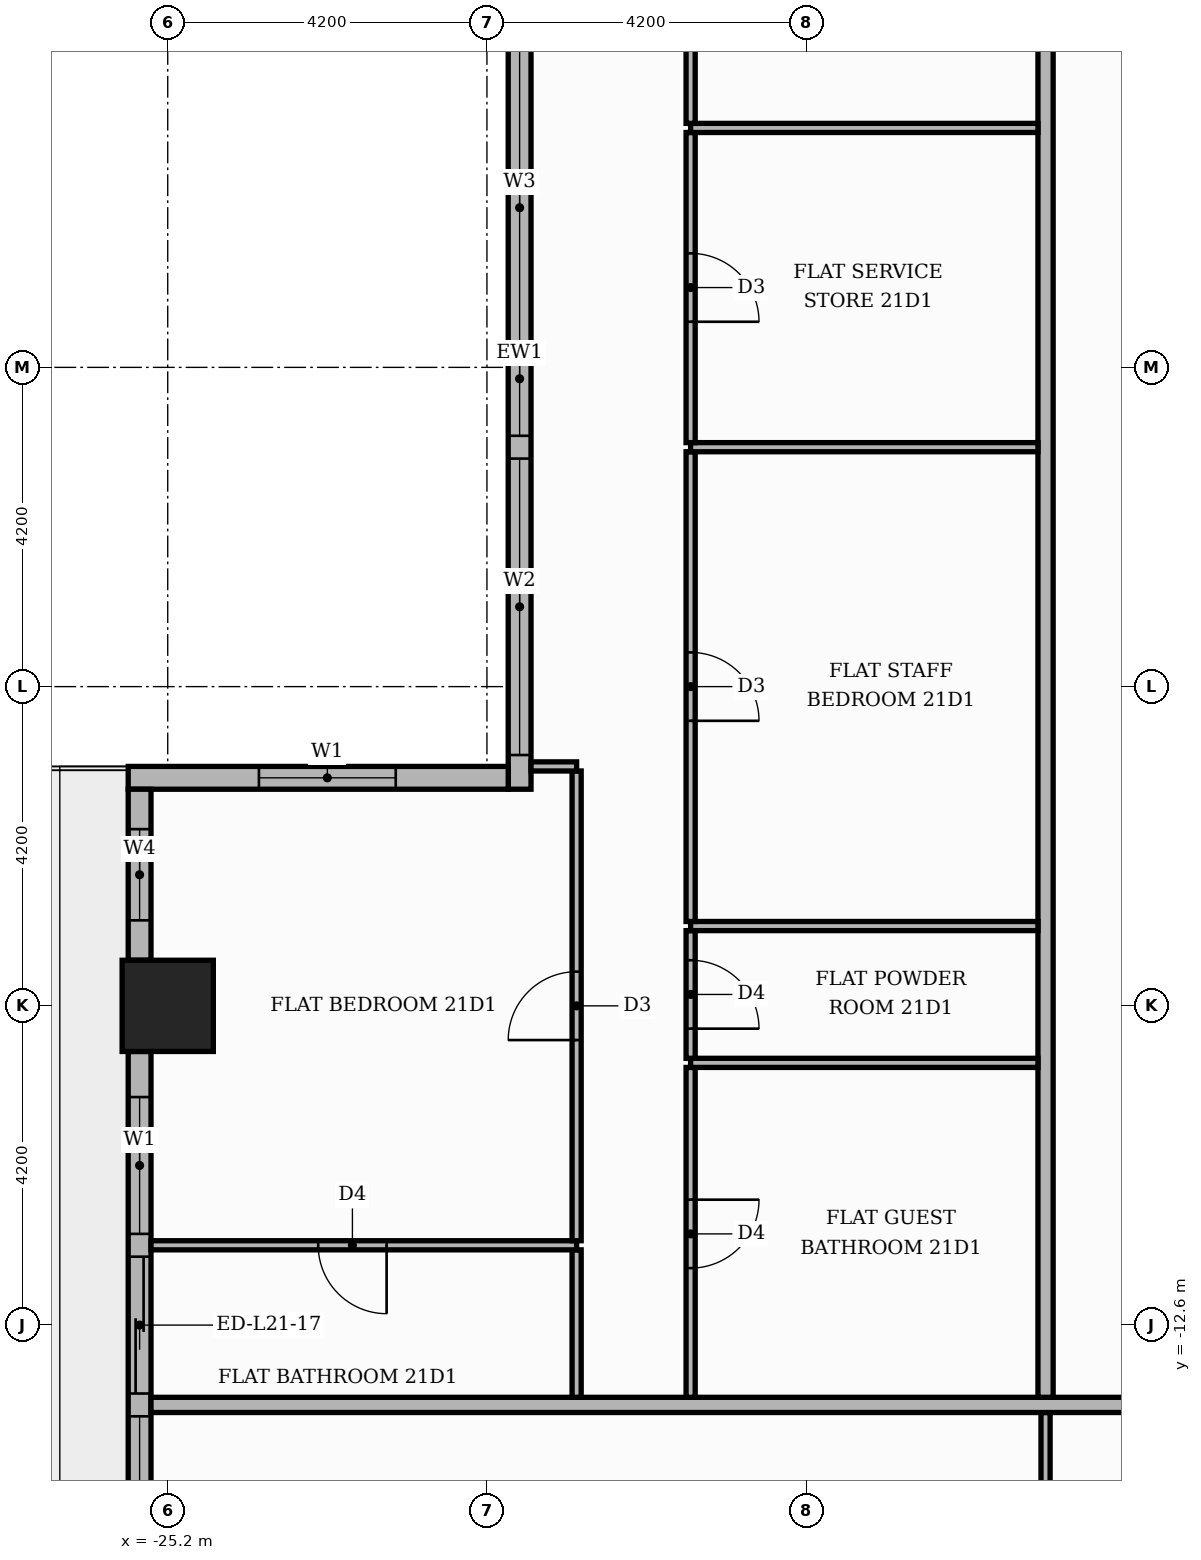
"""IFC4 building model, lengths in metres.
Left out: names, types, materials, properties, quantities, classifications, styles, units other than length and angle.
Written with IfcOpenShell. Run it as: python <this file> out.ifc"""

import sys

from ifc_helpers import new_model, si_unit, direction, frame, frame_2d, origin, origin_2d, place, context, subcontext, project, spatial, rectangle, extrude, element, fill, save


model = new_model("IFC4")
c1 = context("Model", 3, precision=1e-05, world=origin(), true_north=direction((0.0, 1.0)))
c2 = subcontext(c1, "Body", "Model", "MODEL_VIEW")
j1 = project(units=[si_unit("LENGTHUNIT", "METRE"), si_unit("PLANEANGLEUNIT", "RADIAN")], contexts=[c1])
p1 = place(None, origin())
s1 = spatial("IfcSite", under=j1, at=p1, CompositionType="ELEMENT")
p2 = place(p1, origin())
s2 = spatial("IfcBuilding", under=s1, at=p2, CompositionType="ELEMENT")
p3 = place(p2, frame((0.0, 0.0, 90.9)))
s3 = spatial("IfcBuildingStorey", under=s2, at=p3, CompositionType="ELEMENT", Elevation=90.9)
p4 = place(p3, frame((-25.2, -8.4, 0.0), z_axis=(0.0, 0.0, 1.0), x_axis=(1.0, 0.0, 0.0)))
e1 = element("IfcColumn", 1, at=p4, inside=s3, PredefinedType="COLUMN", context=c2, shape_type="SweptSolid", body=[
    extrude(rectangle(XDim=1.2, YDim=1.2, at=origin_2d()), origin(), (0.0, 0.0, 1.0), 3.9),
])
p5 = place(p3, frame((-20.57, 5.25, 0.0), z_axis=(0.0, 0.0, 1.0), x_axis=(0.0, -1.0, 0.0)))
e2 = element("IfcWall", 2, at=p5, inside=s3, PredefinedType="STANDARD", context=c2, shape_type="SweptSolid", body=[
    extrude(rectangle(XDim=10.8, YDim=0.3, at=frame_2d((5.4, 0.0))), origin(), (0.0, 0.0, 1.0), 3.48),
])
p6 = place(p5, frame((0.15, 0.0, 0.9)))
e3 = element("IfcOpeningElement", 3, at=p6, cuts=e2, PredefinedType="OPENING", context=c2, shape_type="SweptSolid", body=[
    extrude(rectangle(XDim=6.0, YDim=2.1, at=frame_2d((3.0, 1.05))), frame((0.0, 0.16, 0.0), z_axis=(0.0, -1.0, 0.0), x_axis=(1.0, 0.0, 0.0)), (0.0, 0.0, 1.0), 0.32),
])
p7 = place(p5, frame((6.45, 0.0, 0.9)))
e4 = element("IfcOpeningElement", 4, at=p7, cuts=e2, PredefinedType="OPENING", context=c2, shape_type="SweptSolid", body=[
    extrude(rectangle(XDim=3.9, YDim=2.1, at=frame_2d((1.95, 1.05))), frame((0.0, 0.16, 0.0), z_axis=(0.0, -1.0, 0.0), x_axis=(1.0, 0.0, 0.0)), (0.0, 0.0, 1.0), 0.32),
])
p8 = place(p3, frame((-20.72, -5.4, 0.0), z_axis=(0.0, 0.0, 1.0), x_axis=(-1.0, 0.0, 0.0)))
e5 = element("IfcWall", 5, at=p8, inside=s3, PredefinedType="STANDARD", context=c2, shape_type="SweptSolid", body=[
    extrude(rectangle(XDim=5.0, YDim=0.3, at=frame_2d((2.5, 0.0))), origin(), (0.0, 0.0, 1.0), 3.48),
])
p9 = place(p8, frame((1.48, 0.0, 0.9)))
e6 = element("IfcOpeningElement", 6, at=p9, cuts=e5, PredefinedType="OPENING", context=c2, shape_type="SweptSolid", body=[
    extrude(rectangle(XDim=1.8, YDim=2.1, at=frame_2d((0.9, 1.05))), frame((0.0, 0.16, 0.0), z_axis=(0.0, -1.0, 0.0), x_axis=(1.0, 0.0, 0.0)), (0.0, 0.0, 1.0), 0.32),
])
p10 = place(p3, frame((-25.57, -5.55, 0.0), z_axis=(0.0, 0.0, 1.0), x_axis=(0.0, -1.0, 0.0)))
e7 = element("IfcWall", 7, at=p10, inside=s3, PredefinedType="STANDARD", context=c2, shape_type="SweptSolid", body=[
    extrude(rectangle(XDim=2.25, YDim=0.3, at=frame_2d((1.125, 0.0))), origin(), (0.0, 0.0, 1.0), 3.48),
])
p11 = place(p10, frame((0.525, 0.0, 0.9)))
e8 = element("IfcOpeningElement", 8, at=p11, cuts=e7, PredefinedType="OPENING", context=c2, shape_type="SweptSolid", body=[
    extrude(rectangle(XDim=1.2, YDim=2.1, at=frame_2d((0.6, 1.05))), frame((0.0, 0.16, 0.0), z_axis=(0.0, -1.0, 0.0), x_axis=(1.0, 0.0, 0.0)), (0.0, 0.0, 1.0), 0.32),
])
p12 = place(p3, frame((-25.57, -9.0, 0.0), z_axis=(0.0, 0.0, 1.0), x_axis=(0.0, -1.0, 0.0)))
e9 = element("IfcWall", 9, at=p12, inside=s3, PredefinedType="STANDARD", context=c2, shape_type="SweptSolid", body=[
    extrude(rectangle(XDim=7.2, YDim=0.3, at=frame_2d((3.6, 0.0))), origin(), (0.0, 0.0, 1.0), 3.48),
])
p13 = place(p12, frame((0.6, 0.0, 0.9)))
e10 = element("IfcOpeningElement", 10, at=p13, cuts=e9, PredefinedType="OPENING", context=c2, shape_type="SweptSolid", body=[
    extrude(rectangle(XDim=1.8, YDim=2.1, at=frame_2d((0.9, 1.05))), frame((0.0, 0.16, 0.0), z_axis=(0.0, -1.0, 0.0), x_axis=(1.0, 0.0, 0.0)), (0.0, 0.0, 1.0), 0.32),
])
p14 = place(p12, frame((2.7, 0.0, 0.0)))
e11 = element("IfcOpeningElement", 11, at=p14, cuts=e9, PredefinedType="OPENING", context=c2, shape_type="SweptSolid", body=[
    extrude(rectangle(XDim=1.8, YDim=2.4, at=frame_2d((0.9, 1.2))), frame((0.0, 0.16, 0.0), z_axis=(0.0, -1.0, 0.0), x_axis=(1.0, 0.0, 0.0)), (0.0, 0.0, 1.0), 0.32),
])
p15 = place(p12, frame((4.8, 0.0, 0.9)))
e12 = element("IfcOpeningElement", 12, at=p15, cuts=e9, PredefinedType="OPENING", context=c2, shape_type="SweptSolid", body=[
    extrude(rectangle(XDim=1.8, YDim=2.1, at=frame_2d((0.9, 1.05))), frame((0.0, 0.16, 0.0), z_axis=(0.0, -1.0, 0.0), x_axis=(1.0, 0.0, 0.0)), (0.0, 0.0, 1.0), 0.32),
])
p16 = place(p3, frame((-13.65, -20.66, 0.0), z_axis=(0.0, 0.0, 1.0), x_axis=(0.0, 1.0, 0.0)))
e13 = element("IfcWall", 13, at=p16, inside=s3, PredefinedType="PARTITIONING", context=c2, shape_type="SweptSolid", body=[
    extrude(rectangle(XDim=6.91, YDim=0.12, at=frame_2d((3.455, 0.0))), origin(), (0.0, 0.0, 1.0), 3.48),
])
p17 = place(p16, frame((3.025, 0.0, 0.0)))
e14 = element("IfcOpeningElement", 14, at=p17, cuts=e13, PredefinedType="OPENING", context=c2, shape_type="SweptSolid", body=[
    extrude(rectangle(XDim=0.9, YDim=2.1, at=frame_2d((0.45, 1.05))), frame((0.0, 0.07, 0.0), z_axis=(0.0, -1.0, 0.0), x_axis=(1.0, 0.0, 0.0)), (0.0, 0.0, 1.0), 0.14),
])
p18 = place(p3, frame((-25.42, -13.65, 0.0), z_axis=(0.0, 0.0, 1.0), x_axis=(1.0, 0.0, 0.0)))
e15 = element("IfcWall", 15, at=p18, inside=s3, PredefinedType="PARTITIONING", context=c2, shape_type="SweptSolid", body=[
    extrude(rectangle(XDim=39.07, YDim=0.2, at=frame_2d((19.535, 0.0))), origin(), (0.0, 0.0, 1.0), 3.48),
])
p19 = place(p18, frame((14.37, 0.0, 0.0)))
e16 = element("IfcOpeningElement", 16, at=p19, cuts=e15, PredefinedType="OPENING", context=c2, shape_type="SweptSolid", body=[
    extrude(rectangle(XDim=1.1, YDim=2.4, at=frame_2d((0.55, 1.2))), frame((0.0, 0.11, 0.0), z_axis=(0.0, -1.0, 0.0), x_axis=(1.0, 0.0, 0.0)), (0.0, 0.0, 1.0), 0.22),
])
p20 = place(p3, frame((-19.82, -13.55, 0.0), z_axis=(0.0, 0.0, 1.0), x_axis=(0.0, 1.0, 0.0)))
e17 = element("IfcWall", 17, at=p20, inside=s3, PredefinedType="PARTITIONING", context=c2, shape_type="SweptSolid", body=[
    extrude(rectangle(XDim=1.94, YDim=0.12, at=frame_2d((0.97, 0.0))), origin(), (0.0, 0.0, 1.0), 3.48),
])
p21 = place(p3, frame((-18.32, -13.55, 0.0), z_axis=(0.0, 0.0, 1.0), x_axis=(0.0, 1.0, 0.0)))
e18 = element("IfcWall", 18, at=p21, inside=s3, PredefinedType="PARTITIONING", context=c2, shape_type="SweptSolid", body=[
    extrude(rectangle(XDim=4.34, YDim=0.12, at=frame_2d((2.17, 0.0))), origin(), (0.0, 0.0, 1.0), 3.48),
])
p22 = place(p21, frame((1.7, 0.0, 0.0)))
e19 = element("IfcOpeningElement", 19, at=p22, cuts=e18, PredefinedType="OPENING", context=c2, shape_type="SweptSolid", body=[
    extrude(rectangle(XDim=0.9, YDim=2.1, at=frame_2d((0.45, 1.05))), frame((0.0, 0.07, 0.0), z_axis=(0.0, -1.0, 0.0), x_axis=(1.0, 0.0, 0.0)), (0.0, 0.0, 1.0), 0.14),
])
p23 = place(p3, frame((-13.65, -13.55, 0.0), z_axis=(0.0, 0.0, 1.0), x_axis=(0.0, 1.0, 0.0)))
e20 = element("IfcWall", 20, at=p23, inside=s3, PredefinedType="PARTITIONING", context=c2, shape_type="SweptSolid", body=[
    extrude(rectangle(XDim=27.1, YDim=0.2, at=frame_2d((13.55, 0.0))), origin(), (0.0, 0.0, 1.0), 3.48),
])
p24 = place(p23, frame((24.55, 0.0, 0.0)))
e21 = element("IfcOpeningElement", 21, at=p24, cuts=e20, PredefinedType="OPENING", context=c2, shape_type="SweptSolid", body=[
    extrude(rectangle(XDim=1.1, YDim=2.4, at=frame_2d((0.55, 1.2))), frame((0.0, 0.11, 0.0), z_axis=(0.0, -1.0, 0.0), x_axis=(1.0, 0.0, 0.0)), (0.0, 0.0, 1.0), 0.22),
])
p25 = place(p3, frame((-25.42, -11.55, 0.0), z_axis=(0.0, 0.0, 1.0), x_axis=(1.0, 0.0, 0.0)))
e22 = element("IfcWall", 22, at=p25, inside=s3, PredefinedType="PARTITIONING", context=c2, shape_type="SweptSolid", body=[
    extrude(rectangle(XDim=5.6, YDim=0.12, at=frame_2d((2.8, 0.0))), origin(), (0.0, 0.0, 1.0), 3.48),
])
p26 = place(p25, frame((2.2, 0.0, 0.0)))
e23 = element("IfcOpeningElement", 23, at=p26, cuts=e22, PredefinedType="OPENING", context=c2, shape_type="SweptSolid", body=[
    extrude(rectangle(XDim=0.9, YDim=2.1, at=frame_2d((0.45, 1.05))), frame((0.0, 0.07, 0.0), z_axis=(0.0, -1.0, 0.0), x_axis=(1.0, 0.0, 0.0)), (0.0, 0.0, 1.0), 0.14),
])
p27 = place(p3, frame((-19.82, -11.49, 0.0), z_axis=(0.0, 0.0, 1.0), x_axis=(0.0, 1.0, 0.0)))
e24 = element("IfcWall", 24, at=p27, inside=s3, PredefinedType="PARTITIONING", context=c2, shape_type="SweptSolid", body=[
    extrude(rectangle(XDim=6.18, YDim=0.12, at=frame_2d((3.09, 0.0))), origin(), (0.0, 0.0, 1.0), 3.48),
])
p28 = place(p27, frame((2.64, 0.0, 0.0)))
e25 = element("IfcOpeningElement", 25, at=p28, cuts=e24, PredefinedType="OPENING", context=c2, shape_type="SweptSolid", body=[
    extrude(rectangle(XDim=0.9, YDim=2.1, at=frame_2d((0.45, 1.05))), frame((0.0, 0.07, 0.0), z_axis=(0.0, -1.0, 0.0), x_axis=(1.0, 0.0, 0.0)), (0.0, 0.0, 1.0), 0.14),
])
p29 = place(p3, frame((-18.32, -9.15, 0.0), z_axis=(0.0, 0.0, 1.0), x_axis=(1.0, 0.0, 0.0)))
e26 = element("IfcWall", 26, at=p29, inside=s3, PredefinedType="PARTITIONING", context=c2, shape_type="SweptSolid", body=[
    extrude(rectangle(XDim=4.57, YDim=0.12, at=frame_2d((2.285, 0.0))), origin(), (0.0, 0.0, 1.0), 3.48),
])
p30 = place(p3, frame((-18.32, -9.09, 0.0), z_axis=(0.0, 0.0, 1.0), x_axis=(0.0, 1.0, 0.0)))
e27 = element("IfcWall", 27, at=p30, inside=s3, PredefinedType="PARTITIONING", context=c2, shape_type="SweptSolid", body=[
    extrude(rectangle(XDim=1.68, YDim=0.12, at=frame_2d((0.84, 0.0))), origin(), (0.0, 0.0, 1.0), 3.48),
])
p31 = place(p30, frame((0.39, 0.0, 0.0)))
e28 = element("IfcOpeningElement", 28, at=p31, cuts=e27, PredefinedType="OPENING", context=c2, shape_type="SweptSolid", body=[
    extrude(rectangle(XDim=0.9, YDim=2.1, at=frame_2d((0.45, 1.05))), frame((0.0, 0.07, 0.0), z_axis=(0.0, -1.0, 0.0), x_axis=(1.0, 0.0, 0.0)), (0.0, 0.0, 1.0), 0.14),
])
p32 = place(p3, frame((-18.32, -7.35, 0.0), z_axis=(0.0, 0.0, 1.0), x_axis=(1.0, 0.0, 0.0)))
e29 = element("IfcWall", 29, at=p32, inside=s3, PredefinedType="PARTITIONING", context=c2, shape_type="SweptSolid", body=[
    extrude(rectangle(XDim=4.57, YDim=0.12, at=frame_2d((2.285, 0.0))), origin(), (0.0, 0.0, 1.0), 3.48),
])
p33 = place(p3, frame((-18.32, -7.29, 0.0), z_axis=(0.0, 0.0, 1.0), x_axis=(0.0, 1.0, 0.0)))
e30 = element("IfcWall", 30, at=p33, inside=s3, PredefinedType="PARTITIONING", context=c2, shape_type="SweptSolid", body=[
    extrude(rectangle(XDim=6.18, YDim=0.12, at=frame_2d((3.09, 0.0))), origin(), (0.0, 0.0, 1.0), 3.48),
])
p34 = place(p33, frame((2.64, 0.0, 0.0)))
e31 = element("IfcOpeningElement", 31, at=p34, cuts=e30, PredefinedType="OPENING", context=c2, shape_type="SweptSolid", body=[
    extrude(rectangle(XDim=0.9, YDim=2.1, at=frame_2d((0.45, 1.05))), frame((0.0, 0.07, 0.0), z_axis=(0.0, -1.0, 0.0), x_axis=(1.0, 0.0, 0.0)), (0.0, 0.0, 1.0), 0.14),
])
p35 = place(p3, frame((-20.42, -5.25, 0.0), z_axis=(0.0, 0.0, 1.0), x_axis=(1.0, 0.0, 0.0)))
e32 = element("IfcWall", 32, at=p35, inside=s3, PredefinedType="PARTITIONING", context=c2, shape_type="SweptSolid", body=[
    extrude(rectangle(XDim=0.6, YDim=0.12, at=frame_2d((0.3, 0.0))), origin(), (0.0, 0.0, 1.0), 3.48),
])
p36 = place(p3, frame((-18.32, -1.05, 0.0), z_axis=(0.0, 0.0, 1.0), x_axis=(1.0, 0.0, 0.0)))
e33 = element("IfcWall", 33, at=p36, inside=s3, PredefinedType="PARTITIONING", context=c2, shape_type="SweptSolid", body=[
    extrude(rectangle(XDim=4.57, YDim=0.12, at=frame_2d((2.285, 0.0))), origin(), (0.0, 0.0, 1.0), 3.48),
])
p37 = place(p3, frame((-18.32, -0.99, 0.0), z_axis=(0.0, 0.0, 1.0), x_axis=(0.0, 1.0, 0.0)))
e34 = element("IfcWall", 34, at=p37, inside=s3, PredefinedType="PARTITIONING", context=c2, shape_type="SweptSolid", body=[
    extrude(rectangle(XDim=4.08, YDim=0.12, at=frame_2d((2.04, 0.0))), origin(), (0.0, 0.0, 1.0), 3.48),
])
p38 = place(p37, frame((1.59, 0.0, 0.0)))
e35 = element("IfcOpeningElement", 35, at=p38, cuts=e34, PredefinedType="OPENING", context=c2, shape_type="SweptSolid", body=[
    extrude(rectangle(XDim=0.9, YDim=2.1, at=frame_2d((0.45, 1.05))), frame((0.0, 0.07, 0.0), z_axis=(0.0, -1.0, 0.0), x_axis=(1.0, 0.0, 0.0)), (0.0, 0.0, 1.0), 0.14),
])
p39 = place(p3, frame((-18.32, 3.15, 0.0), z_axis=(0.0, 0.0, 1.0), x_axis=(1.0, 0.0, 0.0)))
e36 = element("IfcWall", 36, at=p39, inside=s3, PredefinedType="PARTITIONING", context=c2, shape_type="SweptSolid", body=[
    extrude(rectangle(XDim=4.57, YDim=0.12, at=frame_2d((2.285, 0.0))), origin(), (0.0, 0.0, 1.0), 3.48),
])
p40 = place(p3, frame((-18.32, 3.21, 0.0), z_axis=(0.0, 0.0, 1.0), x_axis=(0.0, 1.0, 0.0)))
e37 = element("IfcWall", 37, at=p40, inside=s3, PredefinedType="PARTITIONING", context=c2, shape_type="SweptSolid", body=[
    extrude(rectangle(XDim=6.18, YDim=0.12, at=frame_2d((3.09, 0.0))), origin(), (0.0, 0.0, 1.0), 3.48),
])
p41 = place(p40, frame((2.64, 0.0, 0.0)))
e38 = element("IfcOpeningElement", 38, at=p41, cuts=e37, PredefinedType="OPENING", context=c2, shape_type="SweptSolid", body=[
    extrude(rectangle(XDim=0.9, YDim=2.1, at=frame_2d((0.45, 1.05))), frame((0.0, 0.07, 0.0), z_axis=(0.0, -1.0, 0.0), x_axis=(1.0, 0.0, 0.0)), (0.0, 0.0, 1.0), 0.14),
])
p42 = place(p6, origin())
e39 = element("IfcWindow", 39, at=p42, inside=s3, PartitioningType="SINGLE_PANEL", PredefinedType="WINDOW", context=c2, shape_type="SweptSolid", body=[
    extrude(rectangle(XDim=6.0, YDim=2.1, at=frame_2d((3.0, 1.05))), frame((0.0, 0.03, 0.0), z_axis=(0.0, -1.0, 0.0), x_axis=(1.0, 0.0, 0.0)), (0.0, 0.0, 1.0), 0.06),
])
fill(e3, e39)
p43 = place(p7, origin())
e40 = element("IfcWindow", 40, at=p43, inside=s3, PartitioningType="SINGLE_PANEL", PredefinedType="WINDOW", context=c2, shape_type="SweptSolid", body=[
    extrude(rectangle(XDim=3.9, YDim=2.1, at=frame_2d((1.95, 1.05))), frame((0.0, 0.03, 0.0), z_axis=(0.0, -1.0, 0.0), x_axis=(1.0, 0.0, 0.0)), (0.0, 0.0, 1.0), 0.06),
])
fill(e4, e40)
p44 = place(p9, origin())
e41 = element("IfcWindow", 41, at=p44, inside=s3, PartitioningType="SINGLE_PANEL", PredefinedType="WINDOW", context=c2, shape_type="SweptSolid", body=[
    extrude(rectangle(XDim=1.8, YDim=2.1, at=frame_2d((0.9, 1.05))), frame((0.0, 0.03, 0.0), z_axis=(0.0, -1.0, 0.0), x_axis=(1.0, 0.0, 0.0)), (0.0, 0.0, 1.0), 0.06),
])
fill(e6, e41)
p45 = place(p11, origin())
e42 = element("IfcWindow", 42, at=p45, inside=s3, PartitioningType="SINGLE_PANEL", PredefinedType="WINDOW", context=c2, shape_type="SweptSolid", body=[
    extrude(rectangle(XDim=1.2, YDim=2.1, at=frame_2d((0.6, 1.05))), frame((0.0, 0.03, 0.0), z_axis=(0.0, -1.0, 0.0), x_axis=(1.0, 0.0, 0.0)), (0.0, 0.0, 1.0), 0.06),
])
fill(e8, e42)
p46 = place(p13, origin())
e43 = element("IfcWindow", 43, at=p46, inside=s3, PartitioningType="SINGLE_PANEL", PredefinedType="WINDOW", context=c2, shape_type="SweptSolid", body=[
    extrude(rectangle(XDim=1.8, YDim=2.1, at=frame_2d((0.9, 1.05))), frame((0.0, 0.03, 0.0), z_axis=(0.0, -1.0, 0.0), x_axis=(1.0, 0.0, 0.0)), (0.0, 0.0, 1.0), 0.06),
])
fill(e10, e43)
p47 = place(p14, origin())
e44 = element("IfcDoor", 44, at=p47, inside=s3, OperationType="SLIDING_TO_RIGHT", PredefinedType="DOOR", context=c2, shape_type="SweptSolid", body=[
    extrude(rectangle(XDim=1.8, YDim=2.4, at=frame_2d((0.9, 1.2))), frame((0.0, 0.025, 0.0), z_axis=(0.0, -1.0, 0.0), x_axis=(1.0, 0.0, 0.0)), (0.0, 0.0, 1.0), 0.05),
])
fill(e11, e44)
p48 = place(p15, origin())
e45 = element("IfcWindow", 45, at=p48, inside=s3, PartitioningType="SINGLE_PANEL", PredefinedType="WINDOW", context=c2, shape_type="SweptSolid", body=[
    extrude(rectangle(XDim=1.8, YDim=2.1, at=frame_2d((0.9, 1.05))), frame((0.0, 0.03, 0.0), z_axis=(0.0, -1.0, 0.0), x_axis=(1.0, 0.0, 0.0)), (0.0, 0.0, 1.0), 0.06),
])
fill(e12, e45)
p49 = place(p38, frame((0.9, 0.0, 0.0), z_axis=(0.0, 0.0, 1.0), x_axis=(-1.0, 0.0, 0.0)))
e46 = element("IfcDoor", 46, at=p49, inside=s3, OperationType="SINGLE_SWING_LEFT", PredefinedType="DOOR", context=c2, shape_type="SweptSolid", body=[
    extrude(rectangle(XDim=0.9, YDim=2.1, at=frame_2d((0.45, 1.05))), frame((0.0, 0.025, 0.0), z_axis=(0.0, -1.0, 0.0), x_axis=(1.0, 0.0, 0.0)), (0.0, 0.0, 1.0), 0.05),
])
fill(e35, e46)
p50 = place(p34, frame((0.9, 0.0, 0.0), z_axis=(0.0, 0.0, 1.0), x_axis=(-1.0, 0.0, 0.0)))
e47 = element("IfcDoor", 47, at=p50, inside=s3, OperationType="SINGLE_SWING_LEFT", PredefinedType="DOOR", context=c2, shape_type="SweptSolid", body=[
    extrude(rectangle(XDim=0.9, YDim=2.1, at=frame_2d((0.45, 1.05))), frame((0.0, 0.025, 0.0), z_axis=(0.0, -1.0, 0.0), x_axis=(1.0, 0.0, 0.0)), (0.0, 0.0, 1.0), 0.05),
])
fill(e31, e47)
p51 = place(p31, frame((0.9, 0.0, 0.0), z_axis=(0.0, 0.0, 1.0), x_axis=(-1.0, 0.0, 0.0)))
e48 = element("IfcDoor", 48, at=p51, inside=s3, OperationType="SINGLE_SWING_LEFT", PredefinedType="DOOR", context=c2, shape_type="SweptSolid", body=[
    extrude(rectangle(XDim=0.9, YDim=2.1, at=frame_2d((0.45, 1.05))), frame((0.0, 0.025, 0.0), z_axis=(0.0, -1.0, 0.0), x_axis=(1.0, 0.0, 0.0)), (0.0, 0.0, 1.0), 0.05),
])
fill(e28, e48)
p52 = place(p22, frame((0.9, 0.0, 0.0), z_axis=(0.0, 0.0, 1.0), x_axis=(-1.0, 0.0, 0.0)))
e49 = element("IfcDoor", 49, at=p52, inside=s3, OperationType="SINGLE_SWING_RIGHT", PredefinedType="DOOR", context=c2, shape_type="SweptSolid", body=[
    extrude(rectangle(XDim=0.9, YDim=2.1, at=frame_2d((0.45, 1.05))), frame((0.0, 0.025, 0.0), z_axis=(0.0, -1.0, 0.0), x_axis=(1.0, 0.0, 0.0)), (0.0, 0.0, 1.0), 0.05),
])
fill(e19, e49)
p53 = place(p28, origin())
e50 = element("IfcDoor", 50, at=p53, inside=s3, OperationType="SINGLE_SWING_LEFT", PredefinedType="DOOR", context=c2, shape_type="SweptSolid", body=[
    extrude(rectangle(XDim=0.9, YDim=2.1, at=frame_2d((0.45, 1.05))), frame((0.0, 0.025, 0.0), z_axis=(0.0, -1.0, 0.0), x_axis=(1.0, 0.0, 0.0)), (0.0, 0.0, 1.0), 0.05),
])
fill(e25, e50)
p54 = place(p26, frame((0.9, 0.0, 0.0), z_axis=(0.0, 0.0, 1.0), x_axis=(-1.0, 0.0, 0.0)))
e51 = element("IfcDoor", 51, at=p54, inside=s3, OperationType="SINGLE_SWING_RIGHT", PredefinedType="DOOR", context=c2, shape_type="SweptSolid", body=[
    extrude(rectangle(XDim=0.9, YDim=2.1, at=frame_2d((0.45, 1.05))), frame((0.0, 0.025, 0.0), z_axis=(0.0, -1.0, 0.0), x_axis=(1.0, 0.0, 0.0)), (0.0, 0.0, 1.0), 0.05),
])
fill(e23, e51)
save(model, sys.argv[1])
